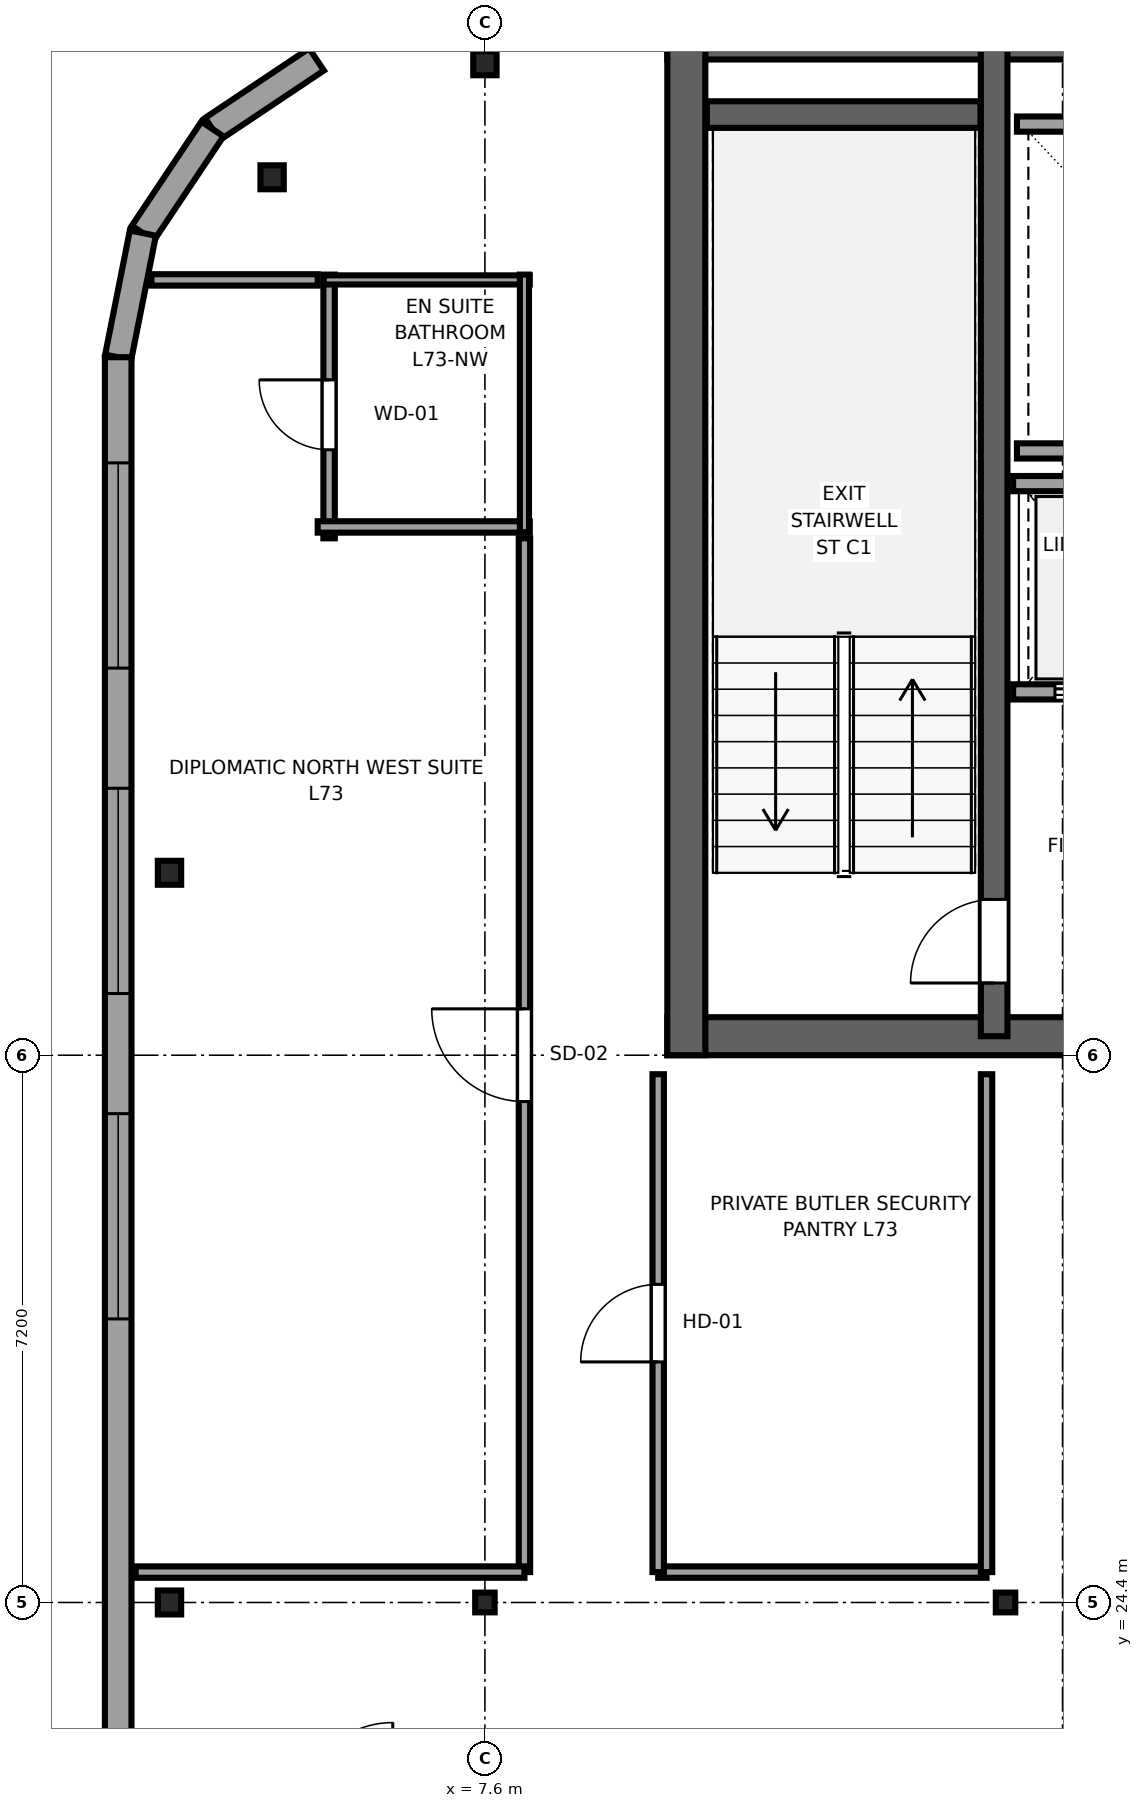
"""IFC4 building model, lengths in metres.
Left out: names, types, materials, properties, quantities, classifications, styles, units other than length and angle.
Written with IfcOpenShell. Run it as: python <this file> out.ifc"""

import sys

from ifc_helpers import new_model, si_unit, direction, frame, frame_2d, origin, origin_2d, place, context, subcontext, project, spatial, rectangle, i_section, extrude, source, transform, mapped, element, fill, save


model = new_model("IFC4")
c1 = context("Model", 3, precision=1e-05, world=origin(), true_north=direction((0.0, 1.0)))
c2 = subcontext(c1, "Body", "Model", "MODEL_VIEW")
j1 = project(units=[si_unit("LENGTHUNIT", "METRE"), si_unit("PLANEANGLEUNIT", "RADIAN")], contexts=[c1])
p1 = place(None, origin())
s1 = spatial("IfcSite", under=j1, at=p1, CompositionType="ELEMENT")
p2 = place(p1, origin())
s2 = spatial("IfcBuilding", under=s1, at=p2, CompositionType="ELEMENT")
p3 = place(p2, frame((0.0, 0.0, 275.05)))
s3 = spatial("IfcBuildingStorey", under=s2, at=p3, CompositionType="ELEMENT", Elevation=275.05)
p4 = place(p3, frame((10.0, 31.85, 0.0), z_axis=(0.0, 0.0, 1.0), x_axis=(1.0, 0.0, 0.0)))
e1 = element("IfcWall", 1, at=p4, inside=s3, PredefinedType="SHEAR", context=c2, shape_type="SweptSolid", body=[
    extrude(rectangle(XDim=26.0, YDim=0.5, at=frame_2d((13.0, 0.0))), origin(), (0.0, 0.0, 1.0), 3.55),
])
p5 = place(p4, frame((7.45, 0.0, 0.0), z_axis=(0.0, 0.0, 1.0), x_axis=(-1.0, 0.0, 0.0)))
e2 = element("IfcOpeningElement", 2, at=p5, cuts=e1, PredefinedType="OPENING", context=c2, shape_type="SweptSolid", body=[
    extrude(rectangle(XDim=1.5, YDim=2.04, at=frame_2d((0.75, 1.02))), frame((0.0, 0.26, 0.0), z_axis=(0.0, -1.0, 0.0), x_axis=(1.0, 0.0, 0.0)), (0.0, 0.0, 1.0), 0.52),
])
p6 = place(p4, frame((13.75, 0.0, 0.0), z_axis=(0.0, 0.0, 1.0), x_axis=(-1.0, 0.0, 0.0)))
e3 = element("IfcOpeningElement", 3, at=p6, cuts=e1, PredefinedType="OPENING", context=c2, shape_type="SweptSolid", body=[
    extrude(rectangle(XDim=1.5, YDim=2.04, at=frame_2d((0.75, 1.02))), frame((0.0, 0.26, 0.0), z_axis=(0.0, -1.0, 0.0), x_axis=(1.0, 0.0, 0.0)), (0.0, 0.0, 1.0), 0.52),
])
p7 = place(p4, frame((20.05, 0.0, 0.0), z_axis=(0.0, 0.0, 1.0), x_axis=(-1.0, 0.0, 0.0)))
e4 = element("IfcOpeningElement", 4, at=p7, cuts=e1, PredefinedType="OPENING", context=c2, shape_type="SweptSolid", body=[
    extrude(rectangle(XDim=1.5, YDim=2.04, at=frame_2d((0.75, 1.02))), frame((0.0, 0.26, 0.0), z_axis=(0.0, -1.0, 0.0), x_axis=(1.0, 0.0, 0.0)), (0.0, 0.0, 1.0), 0.52),
])
p8 = place(p3, frame((10.0, 44.95, 0.0), z_axis=(0.0, 0.0, 1.0), x_axis=(1.0, 0.0, 0.0)))
e5 = element("IfcWall", 5, at=p8, inside=s3, PredefinedType="SHEAR", context=c2, shape_type="SweptSolid", body=[
    extrude(rectangle(XDim=26.0, YDim=0.5, at=frame_2d((13.0, 0.0))), origin(), (0.0, 0.0, 1.0), 3.55),
])
p9 = place(p3, frame((10.25, 31.6, 0.0), z_axis=(0.0, 0.0, 1.0), x_axis=(0.0, 1.0, 0.0)))
e6 = element("IfcWall", 6, at=p9, inside=s3, PredefinedType="SHEAR", context=c2, shape_type="SweptSolid", body=[
    extrude(rectangle(XDim=13.6, YDim=0.5, at=frame_2d((6.8, 0.0))), origin(), (0.0, 0.0, 1.0), 3.55),
])
p10 = place(p3, frame((14.3, 31.85, 0.0), z_axis=(0.0, 0.0, 1.0), x_axis=(0.0, 1.0, 0.0)))
e7 = element("IfcWall", 7, at=p10, inside=s3, PredefinedType="SHEAR", context=c2, shape_type="SweptSolid", body=[
    extrude(rectangle(XDim=13.1, YDim=0.35, at=frame_2d((6.55, 0.0))), origin(), (0.0, 0.0, 1.0), 3.55),
])
p11 = place(p10, frame((0.7, 0.0, 0.0)))
e8 = element("IfcOpeningElement", 8, at=p11, cuts=e7, PredefinedType="OPENING", context=c2, shape_type="SweptSolid", body=[
    extrude(rectangle(XDim=1.1, YDim=2.12, at=frame_2d((0.55, 1.06))), frame((0.0, 0.185, 0.0), z_axis=(0.0, -1.0, 0.0), x_axis=(1.0, 0.0, 0.0)), (0.0, 0.0, 1.0), 0.37),
])
p12 = place(p3, frame((10.52, 43.975, 0.0), z_axis=(0.0, 0.0, 1.0), x_axis=(1.0, 0.0, 0.0)))
e9 = element("IfcWall", 9, at=p12, inside=s3, PredefinedType="SHEAR", context=c2, shape_type="SweptSolid", body=[
    extrude(rectangle(XDim=3.6, YDim=0.35, at=frame_2d((1.8, 0.0))), origin(), (0.0, 0.0, 1.0), 3.55),
])
m1 = source(origin(), c2, "Body", "SweptSolid", [
    extrude(i_section(OverallWidth=0.307, OverallDepth=0.315, WebThickness=0.012, FlangeThickness=0.019, FilletRadius=0.017, at=origin_2d()), origin(), (0.0, 0.0, 1.0), 3.55),
])
p13 = place(p3, frame((3.45, 24.4, 0.0), z_axis=(0.0, 0.0, 1.0), x_axis=(1.0, 0.0, 0.0)))
e10 = element("IfcColumn", 10, at=p13, inside=s3, PredefinedType="COLUMN", context=c2, shape_type="MappedRepresentation", body=[
    mapped(m1, transform((0.0, 0.0, 0.0), x_axis=(1.0, 0.0, 0.0), y_axis=(0.0, 1.0, 0.0), z_axis=(0.0, 0.0, 1.0), scale=1.0)),
])
m2 = source(origin(), c2, "Body", "SweptSolid", [
    extrude(i_section(OverallWidth=0.256, OverallDepth=0.26, WebThickness=0.01, FlangeThickness=0.017, FilletRadius=0.014, at=origin_2d()), origin(), (0.0, 0.0, 1.0), 3.55),
])
for number, where, z_axis, x_axis in (
    (11, (7.6, 24.4, 0.0), (0.0, 0.0, 1.0), (1.0, 0.0, 0.0)),
    (12, (14.45, 24.4, 0.0), (0.0, 0.0, 1.0), (1.0, 0.0, 0.0)),
):
    element("IfcColumn", number, at=place(p3, frame(where, z_axis=z_axis, x_axis=x_axis)), inside=s3, PredefinedType="COLUMN", context=c2, shape_type="MappedRepresentation", body=[
        mapped(m2, transform((0.0, 0.0, 0.0), x_axis=(1.0, 0.0, 0.0), y_axis=(0.0, 1.0, 0.0), z_axis=(0.0, 0.0, 1.0), scale=1.0)),
    ])
for number, where, z_axis, x_axis in (
    (13, (4.8, 43.15, 0.0), (0.0, 0.0, 1.0), (1.0, 0.0, 0.0)),
    (14, (7.6, 44.65, 0.0), (0.0, 0.0, 1.0), (1.0, 0.0, 0.0)),
    (15, (3.45, 34.0, 0.0), (0.0, 0.0, 1.0), (1.0, 0.0, 0.0)),
):
    element("IfcColumn", number, at=place(p3, frame(where, z_axis=z_axis, x_axis=x_axis)), inside=s3, PredefinedType="COLUMN", context=c2, shape_type="MappedRepresentation", body=[
        mapped(m1, transform((0.0, 0.0, 0.0), x_axis=(1.0, 0.0, 0.0), y_axis=(0.0, 1.0, 0.0), z_axis=(0.0, 0.0, 1.0), scale=1.0)),
    ])
for number, where, z_axis, x_axis in (
    (16, (5.385, 44.7, 0.0), (0.0, 0.0, 1.0), (-0.832, -0.556, 0.0)),
    (17, (4.015, 43.785, 0.0), (0.0, 0.0, 1.0), (-0.556, -0.831, 0.0)),
):
    element("IfcWall", number, at=place(p3, frame(where, z_axis=z_axis, x_axis=x_axis)), inside=s3, PredefinedType="SOLIDWALL", context=c2, shape_type="SweptSolid", body=[
        extrude(rectangle(XDim=1.647, YDim=0.35, at=frame_2d((0.824, 0.0))), origin(), (0.0, 0.0, 1.0), 2.86),
    ])
p14 = place(p3, frame((3.1, 42.416, 0.0), z_axis=(0.0, 0.0, 1.0), x_axis=(-0.195044345786, -0.980794424524, 0.0)))
e18 = element("IfcWall", 18, at=p14, inside=s3, PredefinedType="SOLIDWALL", context=c2, shape_type="SweptSolid", body=[
    extrude(rectangle(XDim=1.665, YDim=0.35, at=frame_2d((0.833, 0.0))), origin(), (0.0, 0.0, 1.0), 3.33),
])
p15 = place(p3, frame((2.775, 40.783, 0.0), z_axis=(0.0, 0.0, 1.0), x_axis=(0.0, -1.0, 0.0)))
e19 = element("IfcWall", 19, at=p15, inside=s3, PredefinedType="SOLIDWALL", context=c2, shape_type="SweptSolid", body=[
    extrude(rectangle(XDim=31.166, YDim=0.35, at=frame_2d((15.583, 0.0))), origin(), (0.0, 0.0, 1.0), 3.33),
])
p16 = place(p15, frame((1.39, 0.0, 0.68)))
e20 = element("IfcOpeningElement", 20, at=p16, cuts=e19, PredefinedType="OPENING", context=c2, shape_type="SweptSolid", body=[
    extrude(rectangle(XDim=2.7, YDim=1.95, at=frame_2d((1.35, 0.975))), frame((0.0, 0.185, 0.0), z_axis=(0.0, -1.0, 0.0), x_axis=(1.0, 0.0, 0.0)), (0.0, 0.0, 1.0), 0.37),
])
p17 = place(p15, frame((5.671, 0.0, 0.68)))
e21 = element("IfcOpeningElement", 21, at=p17, cuts=e19, PredefinedType="OPENING", context=c2, shape_type="SweptSolid", body=[
    extrude(rectangle(XDim=2.7, YDim=1.95, at=frame_2d((1.35, 0.975))), frame((0.0, 0.185, 0.0), z_axis=(0.0, -1.0, 0.0), x_axis=(1.0, 0.0, 0.0)), (0.0, 0.0, 1.0), 0.37),
])
p18 = place(p15, frame((9.952, 0.0, 0.68)))
e22 = element("IfcOpeningElement", 22, at=p18, cuts=e19, PredefinedType="OPENING", context=c2, shape_type="SweptSolid", body=[
    extrude(rectangle(XDim=2.7, YDim=1.95, at=frame_2d((1.35, 0.975))), frame((0.0, 0.185, 0.0), z_axis=(0.0, -1.0, 0.0), x_axis=(1.0, 0.0, 0.0)), (0.0, 0.0, 1.0), 0.37),
])
p19 = place(p15, frame((19.564, 0.0, 0.68)))
e23 = element("IfcOpeningElement", 23, at=p19, cuts=e19, PredefinedType="OPENING", context=c2, shape_type="SweptSolid", body=[
    extrude(rectangle(XDim=2.7, YDim=1.95, at=frame_2d((1.35, 0.975))), frame((0.0, 0.185, 0.0), z_axis=(0.0, -1.0, 0.0), x_axis=(1.0, 0.0, 0.0)), (0.0, 0.0, 1.0), 0.37),
])
p20 = place(p15, frame((27.075, 0.0, 0.68)))
e24 = element("IfcOpeningElement", 24, at=p20, cuts=e19, PredefinedType="OPENING", context=c2, shape_type="SweptSolid", body=[
    extrude(rectangle(XDim=2.7, YDim=1.95, at=frame_2d((1.35, 0.975))), frame((0.0, 0.185, 0.0), z_axis=(0.0, -1.0, 0.0), x_axis=(1.0, 0.0, 0.0)), (0.0, 0.0, 1.0), 0.37),
])
for number, where, z_axis, x_axis in (
    (25, (14.6, 39.55, 0.0), (0.0, 0.0, 1.0), (1.0, 0.0, 0.0)),
    (26, (14.6, 43.85, 0.0), (0.0, 0.0, 1.0), (1.0, 0.0, 0.0)),
):
    element("IfcWall", number, at=place(p3, frame(where, z_axis=z_axis, x_axis=x_axis)), inside=s3, PredefinedType="SOLIDWALL", context=c2, shape_type="SweptSolid", body=[
        extrude(rectangle(XDim=4.1, YDim=0.2, at=frame_2d((2.05, 0.0))), origin(), (0.0, 0.0, 1.0), 3.33),
    ])
p21 = place(p3, frame((14.55, 36.38, 0.0), z_axis=(0.0, 0.0, 1.0), x_axis=(1.0, 0.0, 0.0)))
e27 = element("IfcWall", 27, at=p21, inside=s3, PredefinedType="SOLIDWALL", context=c2, shape_type="SweptSolid", body=[
    extrude(rectangle(XDim=4.075, YDim=0.2, at=frame_2d((2.038, 0.0))), origin(), (0.0, 0.0, 1.0), 3.33),
])
p22 = place(p21, frame((0.55, 0.0, 0.0)))
e28 = element("IfcOpeningElement", 28, at=p22, cuts=e27, PredefinedType="OPENING", context=c2, shape_type="SweptSolid", body=[
    extrude(rectangle(XDim=1.1, YDim=2.12, at=frame_2d((0.55, 1.06))), frame((0.0, 0.11, 0.0), z_axis=(0.0, -1.0, 0.0), x_axis=(1.0, 0.0, 0.0)), (0.0, 0.0, 1.0), 0.22),
])
p23 = place(p21, frame((2.45, 0.0, 0.0)))
e29 = element("IfcOpeningElement", 29, at=p23, cuts=e27, PredefinedType="OPENING", context=c2, shape_type="SweptSolid", body=[
    extrude(rectangle(XDim=1.1, YDim=2.12, at=frame_2d((0.55, 1.06))), frame((0.0, 0.11, 0.0), z_axis=(0.0, -1.0, 0.0), x_axis=(1.0, 0.0, 0.0)), (0.0, 0.0, 1.0), 0.22),
])
p24 = place(p3, frame((14.55, 39.12, 0.0), z_axis=(0.0, 0.0, 1.0), x_axis=(1.0, 0.0, 0.0)))
e30 = element("IfcWall", 30, at=p24, inside=s3, PredefinedType="SOLIDWALL", context=c2, shape_type="SweptSolid", body=[
    extrude(rectangle(XDim=4.075, YDim=0.2, at=frame_2d((2.038, 0.0))), origin(), (0.0, 0.0, 1.0), 3.33),
])
p25 = place(p3, frame((5.55, 38.4, 0.0), z_axis=(0.0, 0.0, 1.0), x_axis=(0.0, 1.0, 0.0)))
e31 = element("IfcWall", 31, at=p25, inside=s3, PredefinedType="PARTITIONING", context=c2, shape_type="SweptSolid", body=[
    extrude(rectangle(XDim=3.47, YDim=0.15, at=frame_2d((1.735, 0.0))), origin(), (0.0, 0.0, 1.0), 3.33),
])
p26 = place(p25, frame((1.165, 0.0, 0.0)))
e32 = element("IfcOpeningElement", 32, at=p26, cuts=e31, PredefinedType="OPENING", context=c2, shape_type="SweptSolid", body=[
    extrude(rectangle(XDim=0.92, YDim=2.01, at=frame_2d((0.46, 1.005))), frame((0.0, 0.085, 0.0), z_axis=(0.0, -1.0, 0.0), x_axis=(1.0, 0.0, 0.0)), (0.0, 0.0, 1.0), 0.17),
])
p27 = place(p3, frame((5.4, 38.55, 0.0), z_axis=(0.0, 0.0, 1.0), x_axis=(1.0, 0.0, 0.0)))
e33 = element("IfcWall", 33, at=p27, inside=s3, PredefinedType="PARTITIONING", context=c2, shape_type="SweptSolid", body=[
    extrude(rectangle(XDim=2.79, YDim=0.15, at=frame_2d((1.395, 0.0))), origin(), (0.0, 0.0, 1.0), 3.33),
])
p28 = place(p3, frame((5.48, 41.8, 0.0), z_axis=(0.0, 0.0, 1.0), x_axis=(1.0, 0.0, 0.0)))
e34 = element("IfcWall", 34, at=p28, inside=s3, PredefinedType="PLUMBINGWALL", context=c2, shape_type="SweptSolid", body=[
    extrude(rectangle(XDim=2.71, YDim=0.12, at=frame_2d((1.355, 0.0))), origin(), (0.0, 0.0, 1.0), 3.33),
])
p29 = place(p3, frame((8.12, 38.48, 0.0), z_axis=(0.0, 0.0, 1.0), x_axis=(0.0, 1.0, 0.0)))
e35 = element("IfcWall", 35, at=p29, inside=s3, PredefinedType="PLUMBINGWALL", context=c2, shape_type="SweptSolid", body=[
    extrude(rectangle(XDim=3.39, YDim=0.12, at=frame_2d((1.695, 0.0))), origin(), (0.0, 0.0, 1.0), 3.33),
])
p30 = place(p3, frame((8.12, 24.8, 0.0), z_axis=(0.0, 0.0, 1.0), x_axis=(0.0, 1.0, 0.0)))
e36 = element("IfcWall", 36, at=p30, inside=s3, PredefinedType="PARTITIONING", context=c2, shape_type="SweptSolid", body=[
    extrude(rectangle(XDim=13.6, YDim=0.15, at=frame_2d((6.8, 0.0))), origin(), (0.0, 0.0, 1.0), 3.33),
])
p31 = place(p30, frame((6.19, 0.0, 0.0)))
e37 = element("IfcOpeningElement", 37, at=p31, cuts=e36, PredefinedType="OPENING", context=c2, shape_type="SweptSolid", body=[
    extrude(rectangle(XDim=1.22, YDim=2.08, at=frame_2d((0.61, 1.04))), frame((0.0, 0.085, 0.0), z_axis=(0.0, -1.0, 0.0), x_axis=(1.0, 0.0, 0.0)), (0.0, 0.0, 1.0), 0.17),
])
p32 = place(p3, frame((3.005, 24.8, 0.0), z_axis=(0.0, 0.0, 1.0), x_axis=(1.0, 0.0, 0.0)))
e38 = element("IfcWall", 38, at=p32, inside=s3, PredefinedType="PARTITIONING", context=c2, shape_type="SweptSolid", body=[
    extrude(rectangle(XDim=5.115, YDim=0.15, at=frame_2d((2.558, 0.0))), origin(), (0.0, 0.0, 1.0), 3.33),
])
p33 = place(p3, frame((3.212, 41.8, 0.0), z_axis=(0.0, 0.0, 1.0), x_axis=(1.0, 0.0, 0.0)))
e39 = element("IfcWall", 39, at=p33, inside=s3, PredefinedType="PARTITIONING", context=c2, shape_type="SweptSolid", body=[
    extrude(rectangle(XDim=2.188, YDim=0.15, at=frame_2d((1.094, 0.0))), origin(), (0.0, 0.0, 1.0), 3.33),
])
p34 = place(p3, frame((9.88, 24.8, 0.0), z_axis=(0.0, 0.0, 1.0), x_axis=(1.0, 0.0, 0.0)))
e40 = element("IfcWall", 40, at=p34, inside=s3, PredefinedType="PARTITIONING", context=c2, shape_type="SweptSolid", body=[
    extrude(rectangle(XDim=4.32, YDim=0.15, at=frame_2d((2.16, 0.0))), origin(), (0.0, 0.0, 1.0), 3.33),
])
p35 = place(p3, frame((9.88, 24.8, 0.0), z_axis=(0.0, 0.0, 1.0), x_axis=(0.0, 1.0, 0.0)))
e41 = element("IfcWall", 41, at=p35, inside=s3, PredefinedType="PARTITIONING", context=c2, shape_type="SweptSolid", body=[
    extrude(rectangle(XDim=6.55, YDim=0.15, at=frame_2d((3.275, 0.0))), origin(), (0.0, 0.0, 1.0), 3.33),
])
p36 = place(p35, frame((2.765, 0.0, 0.0)))
e42 = element("IfcOpeningElement", 42, at=p36, cuts=e41, PredefinedType="OPENING", context=c2, shape_type="SweptSolid", body=[
    extrude(rectangle(XDim=1.02, YDim=2.03, at=frame_2d((0.51, 1.015))), frame((0.0, 0.085, 0.0), z_axis=(0.0, -1.0, 0.0), x_axis=(1.0, 0.0, 0.0)), (0.0, 0.0, 1.0), 0.17),
])
p37 = place(p3, frame((14.2, 24.8, 0.0), z_axis=(0.0, 0.0, 1.0), x_axis=(0.0, 1.0, 0.0)))
e43 = element("IfcWall", 43, at=p37, inside=s3, PredefinedType="PARTITIONING", context=c2, shape_type="SweptSolid", body=[
    extrude(rectangle(XDim=6.55, YDim=0.15, at=frame_2d((3.275, 0.0))), origin(), (0.0, 0.0, 1.0), 3.33),
])
m3 = source(origin(), c2, "Body", "SweptSolid", [
    extrude(rectangle(XDim=2.7, YDim=1.95, at=frame_2d((1.35, 0.975))), frame((0.0, 0.09, 0.0), z_axis=(0.0, -1.0, 0.0), x_axis=(1.0, 0.0, 0.0)), (0.0, 0.0, 1.0), 0.06),
])
p38 = place(p16, origin())
e44 = element("IfcWindow", 44, at=p38, inside=s3, PartitioningType="TRIPLE_PANEL_HORIZONTAL", PredefinedType="WINDOW", context=c2, shape_type="MappedRepresentation", body=[
    mapped(m3, transform((0.0, 0.0, 0.0), x_axis=(1.0, 0.0, 0.0), y_axis=(0.0, 1.0, 0.0), z_axis=(0.0, 0.0, 1.0), scale=1.0)),
])
fill(e20, e44)
p39 = place(p17, origin())
e45 = element("IfcWindow", 45, at=p39, inside=s3, PartitioningType="TRIPLE_PANEL_HORIZONTAL", PredefinedType="WINDOW", context=c2, shape_type="MappedRepresentation", body=[
    mapped(m3, transform((0.0, 0.0, 0.0), x_axis=(1.0, 0.0, 0.0), y_axis=(0.0, 1.0, 0.0), z_axis=(0.0, 0.0, 1.0), scale=1.0)),
])
fill(e21, e45)
p40 = place(p18, origin())
e46 = element("IfcWindow", 46, at=p40, inside=s3, PartitioningType="TRIPLE_PANEL_HORIZONTAL", PredefinedType="WINDOW", context=c2, shape_type="MappedRepresentation", body=[
    mapped(m3, transform((0.0, 0.0, 0.0), x_axis=(1.0, 0.0, 0.0), y_axis=(0.0, 1.0, 0.0), z_axis=(0.0, 0.0, 1.0), scale=1.0)),
])
fill(e22, e46)
m4 = source(origin(), c2, "Body", "SweptSolid", [
    extrude(rectangle(XDim=1.1, YDim=2.12, at=frame_2d((0.55, 1.06))), frame((0.0, 0.025, 0.0), z_axis=(0.0, -1.0, 0.0), x_axis=(1.0, 0.0, 0.0)), (0.0, 0.0, 1.0), 0.05),
])
p41 = place(p11, origin())
e47 = element("IfcDoor", 47, at=p41, inside=s3, OperationType="SINGLE_SWING_LEFT", PredefinedType="DOOR", context=c2, shape_type="MappedRepresentation", body=[
    mapped(m4, transform((0.0, 0.0, 0.0), x_axis=(1.0, 0.0, 0.0), y_axis=(0.0, 1.0, 0.0), z_axis=(0.0, 0.0, 1.0), scale=1.0)),
])
fill(e8, e47)
m5 = source(origin(), c2, "Body", "SweptSolid", [
    extrude(rectangle(XDim=1.1, YDim=2.12, at=frame_2d((0.55, 1.06))), frame((0.0, 0.025, 0.0), z_axis=(0.0, -1.0, 0.0), x_axis=(1.0, 0.0, 0.0)), (0.0, 0.0, 1.0), 0.05),
])
p42 = place(p22, origin())
e48 = element("IfcDoor", 48, at=p42, inside=s3, OperationType="SLIDING_TO_LEFT", PredefinedType="DOOR", context=c2, shape_type="MappedRepresentation", body=[
    mapped(m5, transform((0.0, 0.0, 0.0), x_axis=(1.0, 0.0, 0.0), y_axis=(0.0, 1.0, 0.0), z_axis=(0.0, 0.0, 1.0), scale=1.0)),
])
fill(e28, e48)
m6 = source(origin(), c2, "Body", "SweptSolid", [
    extrude(rectangle(XDim=0.92, YDim=2.01, at=frame_2d((0.46, 1.005))), frame((0.0, 0.025, 0.0), z_axis=(0.0, -1.0, 0.0), x_axis=(1.0, 0.0, 0.0)), (0.0, 0.0, 1.0), 0.05),
])
p43 = place(p26, origin())
e49 = element("IfcDoor", 49, at=p43, inside=s3, OperationType="SINGLE_SWING_RIGHT", PredefinedType="DOOR", context=c2, shape_type="MappedRepresentation", body=[
    mapped(m6, transform((0.0, 0.0, 0.0), x_axis=(1.0, 0.0, 0.0), y_axis=(0.0, 1.0, 0.0), z_axis=(0.0, 0.0, 1.0), scale=1.0)),
])
fill(e32, e49)
m7 = source(origin(), c2, "Body", "SweptSolid", [
    extrude(rectangle(XDim=1.22, YDim=2.08, at=frame_2d((0.61, 1.04))), frame((0.0, 0.025, 0.0), z_axis=(0.0, -1.0, 0.0), x_axis=(1.0, 0.0, 0.0)), (0.0, 0.0, 1.0), 0.05),
])
p44 = place(p31, origin())
e50 = element("IfcDoor", 50, at=p44, inside=s3, OperationType="SINGLE_SWING_RIGHT", PredefinedType="DOOR", context=c2, shape_type="MappedRepresentation", body=[
    mapped(m7, transform((0.0, 0.0, 0.0), x_axis=(1.0, 0.0, 0.0), y_axis=(0.0, 1.0, 0.0), z_axis=(0.0, 0.0, 1.0), scale=1.0)),
])
fill(e37, e50)
m8 = source(origin(), c2, "Body", "SweptSolid", [
    extrude(rectangle(XDim=1.02, YDim=2.03, at=frame_2d((0.51, 1.015))), frame((0.0, 0.025, 0.0), z_axis=(0.0, -1.0, 0.0), x_axis=(1.0, 0.0, 0.0)), (0.0, 0.0, 1.0), 0.05),
])
p45 = place(p36, origin())
e51 = element("IfcDoor", 51, at=p45, inside=s3, OperationType="SINGLE_SWING_LEFT", PredefinedType="DOOR", context=c2, shape_type="MappedRepresentation", body=[
    mapped(m8, transform((0.0, 0.0, 0.0), x_axis=(1.0, 0.0, 0.0), y_axis=(0.0, 1.0, 0.0), z_axis=(0.0, 0.0, 1.0), scale=1.0)),
])
fill(e42, e51)
save(model, sys.argv[1])
